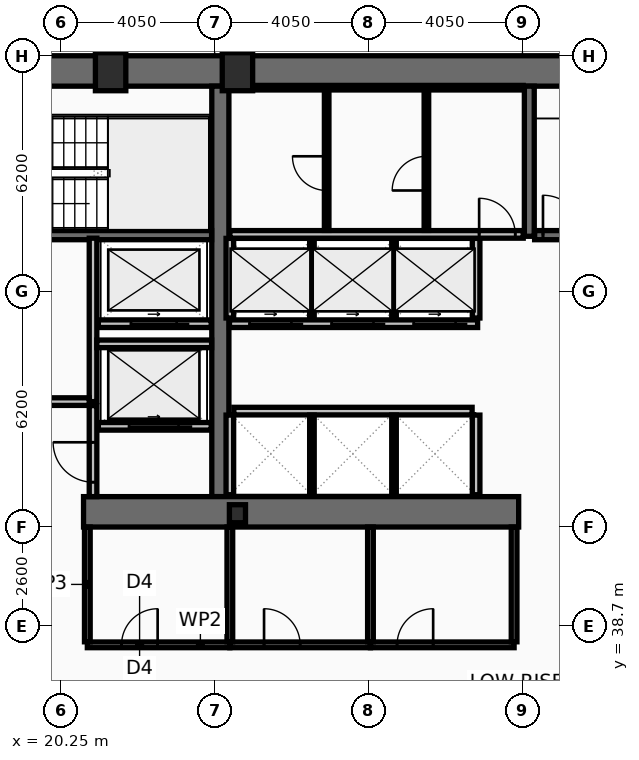
"""IFC4 building model, lengths in metres.
Left out: names, types, materials, properties, quantities, classifications, styles, units other than length and angle.
Written with IfcOpenShell. Run it as: python <this file> out.ifc"""

import sys

from ifc_helpers import new_model, si_unit, direction, frame, frame_2d, origin, origin_2d, place, context, subcontext, project, spatial, rectangle, hollow_rectangle, i_section, extrude, element, fill, save


model = new_model("IFC4")
c1 = context("Model", 3, precision=1e-05, world=origin(), true_north=direction((0.0, 1.0)))
c2 = subcontext(c1, "Body", "Model", "MODEL_VIEW")
j1 = project(units=[si_unit("LENGTHUNIT", "METRE"), si_unit("PLANEANGLEUNIT", "RADIAN")], contexts=[c1])
p1 = place(None, origin())
s1 = spatial("IfcSite", under=j1, at=p1, CompositionType="ELEMENT")
p2 = place(p1, origin())
s2 = spatial("IfcBuilding", under=s1, at=p2, CompositionType="ELEMENT")
p3 = place(p2, frame((0.0, 0.0, 41.8)))
s3 = spatial("IfcBuildingStorey", under=s2, at=p3, CompositionType="ELEMENT", Elevation=41.8)
p4 = place(p3, frame((16.2, 53.3, 0.0), z_axis=(0.0, 0.0, 1.0), x_axis=(1.0, 0.0, 0.0)))
e1 = element("IfcWall", 1, at=p4, inside=s3, PredefinedType="SHEAR", context=c2, shape_type="SweptSolid", body=[
    extrude(rectangle(XDim=40.5, YDim=0.8, at=frame_2d((20.25, 0.0))), origin(), (0.0, 0.0, 1.0), 3.82),
])
p5 = place(p3, frame((24.45, 42.1, 0.0), z_axis=(0.0, 0.0, 1.0), x_axis=(0.0, 1.0, 0.0)))
e2 = element("IfcWall", 2, at=p5, inside=s3, PredefinedType="SHEAR", context=c2, shape_type="SweptSolid", body=[
    extrude(rectangle(XDim=10.8, YDim=0.45, at=frame_2d((5.4, 0.0))), origin(), (0.0, 0.0, 1.0), 3.82),
])
p6 = place(p3, frame((32.3, 41.7, 0.0), z_axis=(0.0, 0.0, 1.0), x_axis=(-1.0, 0.0, 0.0)))
e3 = element("IfcWall", 3, at=p6, inside=s3, PredefinedType="SHEAR", context=c2, shape_type="SweptSolid", body=[
    extrude(rectangle(XDim=11.45, YDim=0.8, at=frame_2d((5.725, 0.0))), origin(), (0.0, 0.0, 1.0), 3.82),
])
p7 = place(p3, frame((32.58, 48.95, 0.0), z_axis=(0.0, 0.0, 1.0), x_axis=(0.0, 1.0, 0.0)))
e4 = element("IfcWall", 4, at=p7, inside=s3, PredefinedType="SHEAR", context=c2, shape_type="SweptSolid", body=[
    extrude(rectangle(XDim=3.95, YDim=0.26, at=frame_2d((1.975, 0.0))), origin(), (0.0, 0.0, 1.0), 3.82),
])
p8 = place(p3, frame((17.0, 48.98, 0.0), z_axis=(0.0, 0.0, 1.0), x_axis=(1.0, 0.0, 0.0)))
e5 = element("IfcWall", 5, at=p8, inside=s3, PredefinedType="SHEAR", context=c2, shape_type="SweptSolid", body=[
    extrude(rectangle(XDim=7.22, YDim=0.24, at=frame_2d((3.61, 0.0))), origin(), (0.0, 0.0, 1.0), 3.82),
])
p9 = place(p8, frame((0.22, 0.0, 0.0)))
e6 = element("IfcOpeningElement", 6, at=p9, cuts=e5, PredefinedType="OPENING", context=c2, shape_type="SweptSolid", body=[
    extrude(rectangle(XDim=1.05, YDim=2.15, at=frame_2d((0.525, 1.075))), frame((0.0, 0.13, 0.0), z_axis=(0.0, -1.0, 0.0), x_axis=(1.0, 0.0, 0.0)), (0.0, 0.0, 1.0), 0.26),
])
p10 = place(p3, frame((32.72, 48.98, 0.0), z_axis=(0.0, 0.0, 1.0), x_axis=(1.0, 0.0, 0.0)))
e7 = element("IfcWall", 7, at=p10, inside=s3, PredefinedType="SHEAR", context=c2, shape_type="SweptSolid", body=[
    extrude(rectangle(XDim=7.56, YDim=0.24, at=frame_2d((3.78, 0.0))), origin(), (0.0, 0.0, 1.0), 3.82),
])
p11 = place(p10, frame((0.22, 0.0, 0.0)))
e8 = element("IfcOpeningElement", 8, at=p11, cuts=e7, PredefinedType="OPENING", context=c2, shape_type="SweptSolid", body=[
    extrude(rectangle(XDim=1.05, YDim=2.15, at=frame_2d((0.525, 1.075))), frame((0.0, 0.13, 0.0), z_axis=(0.0, -1.0, 0.0), x_axis=(1.0, 0.0, 0.0)), (0.0, 0.0, 1.0), 0.26),
])
for number, where, z_axis, x_axis in (
    (9, (21.562, 53.28, 0.0), (0.0, 0.0, 1.0), (1.0, 0.0, 0.0)),
    (10, (24.9, 53.28, 0.0), (0.0, 0.0, 1.0), (1.0, 0.0, 0.0)),
):
    element("IfcColumn", number, at=place(p3, frame(where, z_axis=z_axis, x_axis=x_axis)), inside=s3, PredefinedType="COLUMN", context=c2, shape_type="SweptSolid", body=[
        extrude(hollow_rectangle(XDim=0.8, YDim=1.0, WallThickness=0.055, at=origin_2d()), origin(), (0.0, 0.0, 1.0), 4.0),
    ])
p12 = place(p3, frame((24.9, 41.65, 0.0), z_axis=(0.0, 0.0, 1.0), x_axis=(1.0, 0.0, 0.0)))
e11 = element("IfcColumn", 11, at=p12, inside=s3, PredefinedType="COLUMN", context=c2, shape_type="SweptSolid", body=[
    extrude(i_section(OverallWidth=0.424, OverallDepth=0.474, WebThickness=0.048, FlangeThickness=0.077, at=origin_2d()), origin(), (0.0, 0.0, 1.0), 4.0),
])
p13 = place(p3, frame((24.21, 43.95, 0.0), z_axis=(0.0, 0.0, 1.0), x_axis=(-1.0, 0.0, 0.0)))
e12 = element("IfcWall", 12, at=p13, inside=s3, PredefinedType="PARTITIONING", context=c2, shape_type="SweptSolid", body=[
    extrude(rectangle(XDim=2.97, YDim=0.2, at=frame_2d((1.485, 0.0))), origin(), (0.0, 0.0, 1.0), 3.82),
])
p14 = place(p13, frame((0.86, 0.0, 0.0)))
e13 = element("IfcOpeningElement", 13, at=p14, cuts=e12, PredefinedType="OPENING", context=c2, shape_type="SweptSolid", body=[
    extrude(rectangle(XDim=1.3, YDim=2.18, at=frame_2d((0.65, 1.09))), frame((0.0, 0.11, 0.0), z_axis=(0.0, -1.0, 0.0), x_axis=(1.0, 0.0, 0.0)), (0.0, 0.0, 1.0), 0.22),
])
p15 = place(p3, frame((24.21, 46.65, 0.0), z_axis=(0.0, 0.0, 1.0), x_axis=(-1.0, 0.0, 0.0)))
e14 = element("IfcWall", 14, at=p15, inside=s3, PredefinedType="PARTITIONING", context=c2, shape_type="SweptSolid", body=[
    extrude(rectangle(XDim=2.97, YDim=0.2, at=frame_2d((1.485, 0.0))), origin(), (0.0, 0.0, 1.0), 3.82),
])
p16 = place(p15, frame((0.91, 0.0, 0.0)))
e15 = element("IfcOpeningElement", 15, at=p16, cuts=e14, PredefinedType="OPENING", context=c2, shape_type="SweptSolid", body=[
    extrude(rectangle(XDim=1.2, YDim=2.18, at=frame_2d((0.6, 1.09))), frame((0.0, 0.11, 0.0), z_axis=(0.0, -1.0, 0.0), x_axis=(1.0, 0.0, 0.0)), (0.0, 0.0, 1.0), 0.22),
])
p17 = place(p3, frame((31.22, 46.65, 0.0), z_axis=(0.0, 0.0, 1.0), x_axis=(-1.0, 0.0, 0.0)))
e16 = element("IfcWall", 16, at=p17, inside=s3, PredefinedType="PARTITIONING", context=c2, shape_type="SweptSolid", body=[
    extrude(rectangle(XDim=6.53, YDim=0.2, at=frame_2d((3.265, 0.0))), origin(), (0.0, 0.0, 1.0), 3.82),
])
p18 = place(p17, frame((4.9, 0.0, 0.0)))
e17 = element("IfcOpeningElement", 17, at=p18, cuts=e16, PredefinedType="OPENING", context=c2, shape_type="SweptSolid", body=[
    extrude(rectangle(XDim=1.1, YDim=2.18, at=frame_2d((0.55, 1.09))), frame((0.0, 0.11, 0.0), z_axis=(0.0, -1.0, 0.0), x_axis=(1.0, 0.0, 0.0)), (0.0, 0.0, 1.0), 0.22),
])
p19 = place(p17, frame((2.74, 0.0, 0.0)))
e18 = element("IfcOpeningElement", 18, at=p19, cuts=e16, PredefinedType="OPENING", context=c2, shape_type="SweptSolid", body=[
    extrude(rectangle(XDim=1.1, YDim=2.18, at=frame_2d((0.55, 1.09))), frame((0.0, 0.11, 0.0), z_axis=(0.0, -1.0, 0.0), x_axis=(1.0, 0.0, 0.0)), (0.0, 0.0, 1.0), 0.22),
])
p20 = place(p17, frame((0.58, 0.0, 0.0)))
e19 = element("IfcOpeningElement", 19, at=p20, cuts=e16, PredefinedType="OPENING", context=c2, shape_type="SweptSolid", body=[
    extrude(rectangle(XDim=1.1, YDim=2.18, at=frame_2d((0.55, 1.09))), frame((0.0, 0.11, 0.0), z_axis=(0.0, -1.0, 0.0), x_axis=(1.0, 0.0, 0.0)), (0.0, 0.0, 1.0), 0.22),
])
p21 = place(p3, frame((21.1, 44.6, 0.0), z_axis=(0.0, 0.0, 1.0), x_axis=(0.0, 1.0, 0.0)))
e20 = element("IfcWall", 20, at=p21, inside=s3, PredefinedType="PARTITIONING", context=c2, shape_type="SweptSolid", body=[
    extrude(rectangle(XDim=4.3, YDim=0.2, at=frame_2d((2.15, 0.0))), origin(), (0.0, 0.0, 1.0), 3.82),
])
p22 = place(p3, frame((17.0, 44.6, 0.0), z_axis=(0.0, 0.0, 1.0), x_axis=(1.0, 0.0, 0.0)))
e21 = element("IfcWall", 21, at=p22, inside=s3, PredefinedType="PARTITIONING", context=c2, shape_type="SweptSolid", body=[
    extrude(rectangle(XDim=4.0, YDim=0.2, at=frame_2d((2.0, 0.0))), origin(), (0.0, 0.0, 1.0), 3.82),
])
p23 = place(p22, frame((1.25, 0.0, 0.0)))
e22 = element("IfcOpeningElement", 22, at=p23, cuts=e21, PredefinedType="OPENING", context=c2, shape_type="SweptSolid", body=[
    extrude(rectangle(XDim=1.05, YDim=2.15, at=frame_2d((0.525, 1.075))), frame((0.0, 0.11, 0.0), z_axis=(0.0, -1.0, 0.0), x_axis=(1.0, 0.0, 0.0)), (0.0, 0.0, 1.0), 0.22),
])
p24 = place(p3, frame((21.2, 46.12, 0.0), z_axis=(0.0, 0.0, 1.0), x_axis=(1.0, 0.0, 0.0)))
e23 = element("IfcWall", 23, at=p24, inside=s3, PredefinedType="PARTITIONING", context=c2, shape_type="SweptSolid", body=[
    extrude(rectangle(XDim=3.02, YDim=0.2, at=frame_2d((1.51, 0.0))), origin(), (0.0, 0.0, 1.0), 3.82),
])
p25 = place(p3, frame((21.1, 42.1, 0.0), z_axis=(0.0, 0.0, 1.0), x_axis=(0.0, 1.0, 0.0)))
e24 = element("IfcWall", 24, at=p25, inside=s3, PredefinedType="PARTITIONING", context=c2, shape_type="SweptSolid", body=[
    extrude(rectangle(XDim=2.395, YDim=0.2, at=frame_2d((1.198, 0.0))), origin(), (0.0, 0.0, 1.0), 3.82),
])
p26 = place(p25, frame((0.38, 0.0, 0.0)))
e25 = element("IfcOpeningElement", 25, at=p26, cuts=e24, PredefinedType="OPENING", context=c2, shape_type="SweptSolid", body=[
    extrude(rectangle(XDim=1.05, YDim=2.15, at=frame_2d((0.525, 1.075))), frame((0.0, 0.11, 0.0), z_axis=(0.0, -1.0, 0.0), x_axis=(1.0, 0.0, 0.0)), (0.0, 0.0, 1.0), 0.22),
])
for number, where, z_axis, x_axis in (
    (26, (24.7, 46.8, 0.0), (0.0, 0.0, 1.0), (0.0, 1.0, 0.0)),
    (27, (31.18, 46.8, 0.0), (0.0, 0.0, 1.0), (0.0, 1.0, 0.0)),
):
    element("IfcWall", number, at=place(p3, frame(where, z_axis=z_axis, x_axis=x_axis)), inside=s3, PredefinedType="PARTITIONING", context=c2, shape_type="SweptSolid", body=[
        extrude(rectangle(XDim=2.095, YDim=0.2, at=frame_2d((1.047, 0.0))), origin(), (0.0, 0.0, 1.0), 3.82),
    ])
for number, where, z_axis, x_axis in (
    (28, (26.86, 46.8, 0.0), (0.0, 0.0, 1.0), (0.0, 1.0, 0.0)),
    (29, (29.02, 46.8, 0.0), (0.0, 0.0, 1.0), (0.0, 1.0, 0.0)),
):
    element("IfcWall", number, at=place(p3, frame(where, z_axis=z_axis, x_axis=x_axis)), inside=s3, PredefinedType="PARTITIONING", context=c2, shape_type="SweptSolid", body=[
        extrude(rectangle(XDim=2.095, YDim=0.12, at=frame_2d((1.047, 0.0))), origin(), (0.0, 0.0, 1.0), 3.82),
    ])
p27 = place(p3, frame((24.805, 44.35, 0.0), z_axis=(0.0, 0.0, 1.0), x_axis=(1.0, 0.0, 0.0)))
e30 = element("IfcWall", 30, at=p27, inside=s3, PredefinedType="PARTITIONING", context=c2, shape_type="SweptSolid", body=[
    extrude(rectangle(XDim=6.27, YDim=0.2, at=frame_2d((3.135, 0.0))), origin(), (0.0, 0.0, 1.0), 3.82),
])
for number, where, z_axis, x_axis in (
    (31, (24.7, 42.15, 0.0), (0.0, 0.0, 1.0), (0.0, 1.0, 0.0)),
    (32, (31.18, 42.15, 0.0), (0.0, 0.0, 1.0), (0.0, 1.0, 0.0)),
):
    element("IfcWall", number, at=place(p3, frame(where, z_axis=z_axis, x_axis=x_axis)), inside=s3, PredefinedType="PARTITIONING", context=c2, shape_type="SweptSolid", body=[
        extrude(rectangle(XDim=2.095, YDim=0.2, at=frame_2d((1.048, 0.0))), origin(), (0.0, 0.0, 1.0), 3.82),
    ])
for number, where, z_axis, x_axis in (
    (33, (26.86, 42.15, 0.0), (0.0, 0.0, 1.0), (0.0, 1.0, 0.0)),
    (34, (29.02, 42.15, 0.0), (0.0, 0.0, 1.0), (0.0, 1.0, 0.0)),
):
    element("IfcWall", number, at=place(p3, frame(where, z_axis=z_axis, x_axis=x_axis)), inside=s3, PredefinedType="PARTITIONING", context=c2, shape_type="SweptSolid", body=[
        extrude(rectangle(XDim=2.095, YDim=0.12, at=frame_2d((1.048, 0.0))), origin(), (0.0, 0.0, 1.0), 3.82),
    ])
p28 = place(p3, frame((24.7, 52.86, 0.0), z_axis=(0.0, 0.0, 1.0), x_axis=(1.0, 0.0, 0.0)))
e35 = element("IfcWall", 35, at=p28, inside=s3, PredefinedType="PARTITIONING", context=c2, shape_type="SweptSolid", body=[
    extrude(rectangle(XDim=7.72, YDim=0.12, at=frame_2d((3.86, 0.0))), origin(), (0.0, 0.0, 1.0), 3.82),
])
p29 = place(p3, frame((24.7, 49.0, 0.0), z_axis=(0.0, 0.0, 1.0), x_axis=(1.0, 0.0, 0.0)))
e36 = element("IfcWall", 36, at=p29, inside=s3, PredefinedType="PARTITIONING", context=c2, shape_type="SweptSolid", body=[
    extrude(rectangle(XDim=7.72, YDim=0.2, at=frame_2d((3.86, 0.0))), origin(), (0.0, 0.0, 1.0), 3.82),
])
p30 = place(p29, frame((6.56, 0.0, 0.0)))
e37 = element("IfcOpeningElement", 37, at=p30, cuts=e36, PredefinedType="OPENING", context=c2, shape_type="SweptSolid", body=[
    extrude(rectangle(XDim=0.95, YDim=2.1, at=frame_2d((0.475, 1.05))), frame((0.0, 0.11, 0.0), z_axis=(0.0, -1.0, 0.0), x_axis=(1.0, 0.0, 0.0)), (0.0, 0.0, 1.0), 0.22),
])
p31 = place(p3, frame((27.248, 49.105, 0.0), z_axis=(0.0, 0.0, 1.0), x_axis=(0.0, 1.0, 0.0)))
e38 = element("IfcWall", 38, at=p31, inside=s3, PredefinedType="PARTITIONING", context=c2, shape_type="SweptSolid", body=[
    extrude(rectangle(XDim=3.69, YDim=0.12, at=frame_2d((1.845, 0.0))), origin(), (0.0, 0.0, 1.0), 3.82),
])
p32 = place(p31, frame((1.05, 0.0, 0.0)))
e39 = element("IfcOpeningElement", 39, at=p32, cuts=e38, PredefinedType="OPENING", context=c2, shape_type="SweptSolid", body=[
    extrude(rectangle(XDim=0.9, YDim=2.05, at=frame_2d((0.45, 1.025))), frame((0.0, 0.07, 0.0), z_axis=(0.0, -1.0, 0.0), x_axis=(1.0, 0.0, 0.0)), (0.0, 0.0, 1.0), 0.14),
])
p33 = place(p3, frame((29.872, 49.105, 0.0), z_axis=(0.0, 0.0, 1.0), x_axis=(0.0, 1.0, 0.0)))
e40 = element("IfcWall", 40, at=p33, inside=s3, PredefinedType="PARTITIONING", context=c2, shape_type="SweptSolid", body=[
    extrude(rectangle(XDim=3.69, YDim=0.12, at=frame_2d((1.845, 0.0))), origin(), (0.0, 0.0, 1.0), 3.82),
])
p34 = place(p33, frame((1.05, 0.0, 0.0)))
e41 = element("IfcOpeningElement", 41, at=p34, cuts=e40, PredefinedType="OPENING", context=c2, shape_type="SweptSolid", body=[
    extrude(rectangle(XDim=0.9, YDim=2.05, at=frame_2d((0.45, 1.025))), frame((0.0, 0.07, 0.0), z_axis=(0.0, -1.0, 0.0), x_axis=(1.0, 0.0, 0.0)), (0.0, 0.0, 1.0), 0.14),
])
p35 = place(p3, frame((20.95, 38.2, 0.0), z_axis=(0.0, 0.0, 1.0), x_axis=(1.0, 0.0, 0.0)))
e42 = element("IfcWall", 42, at=p35, inside=s3, PredefinedType="PARTITIONING", context=c2, shape_type="SweptSolid", body=[
    extrude(rectangle(XDim=3.75, YDim=0.15, at=frame_2d((1.875, 0.0))), origin(), (0.0, 0.0, 1.0), 3.01),
])
p36 = place(p35, frame((0.9, 0.0, 0.0)))
e43 = element("IfcOpeningElement", 43, at=p36, cuts=e42, PredefinedType="OPENING", context=c2, shape_type="SweptSolid", body=[
    extrude(rectangle(XDim=0.95, YDim=2.05, at=frame_2d((0.475, 1.025))), frame((0.0, 0.085, 0.0), z_axis=(0.0, -1.0, 0.0), x_axis=(1.0, 0.0, 0.0)), (0.0, 0.0, 1.0), 0.17),
])
p37 = place(p3, frame((24.7, 38.2, 0.0), z_axis=(0.0, 0.0, 1.0), x_axis=(1.0, 0.0, 0.0)))
e44 = element("IfcWall", 44, at=p37, inside=s3, PredefinedType="PARTITIONING", context=c2, shape_type="SweptSolid", body=[
    extrude(rectangle(XDim=3.7, YDim=0.15, at=frame_2d((1.85, 0.0))), origin(), (0.0, 0.0, 1.0), 3.01),
])
p38 = place(p37, frame((0.9, 0.0, 0.0)))
e45 = element("IfcOpeningElement", 45, at=p38, cuts=e44, PredefinedType="OPENING", context=c2, shape_type="SweptSolid", body=[
    extrude(rectangle(XDim=0.95, YDim=2.05, at=frame_2d((0.475, 1.025))), frame((0.0, 0.085, 0.0), z_axis=(0.0, -1.0, 0.0), x_axis=(1.0, 0.0, 0.0)), (0.0, 0.0, 1.0), 0.17),
])
p39 = place(p3, frame((28.4, 38.2, 0.0), z_axis=(0.0, 0.0, 1.0), x_axis=(1.0, 0.0, 0.0)))
e46 = element("IfcWall", 46, at=p39, inside=s3, PredefinedType="PARTITIONING", context=c2, shape_type="SweptSolid", body=[
    extrude(rectangle(XDim=3.78, YDim=0.15, at=frame_2d((1.89, 0.0))), origin(), (0.0, 0.0, 1.0), 3.01),
])
p40 = place(p39, frame((0.7, 0.0, 0.0)))
e47 = element("IfcOpeningElement", 47, at=p40, cuts=e46, PredefinedType="OPENING", context=c2, shape_type="SweptSolid", body=[
    extrude(rectangle(XDim=0.95, YDim=2.05, at=frame_2d((0.475, 1.025))), frame((0.0, 0.085, 0.0), z_axis=(0.0, -1.0, 0.0), x_axis=(1.0, 0.0, 0.0)), (0.0, 0.0, 1.0), 0.17),
])
p41 = place(p3, frame((20.95, 38.28, 0.0), z_axis=(0.0, 0.0, 1.0), x_axis=(0.0, 1.0, 0.0)))
e48 = element("IfcWall", 48, at=p41, inside=s3, PredefinedType="PARTITIONING", context=c2, shape_type="SweptSolid", body=[
    extrude(rectangle(XDim=3.02, YDim=0.15, at=frame_2d((1.51, 0.0))), origin(), (0.0, 0.0, 1.0), 3.82),
])
p42 = place(p3, frame((24.7, 38.28, 0.0), z_axis=(0.0, 0.0, 1.0), x_axis=(0.0, 1.0, 0.0)))
e49 = element("IfcWall", 49, at=p42, inside=s3, PredefinedType="PARTITIONING", context=c2, shape_type="SweptSolid", body=[
    extrude(rectangle(XDim=3.02, YDim=0.15, at=frame_2d((1.51, 0.0))), origin(), (0.0, 0.0, 1.0), 3.01),
])
for number, where, z_axis, x_axis in (
    (50, (28.4, 38.28, 0.0), (0.0, 0.0, 1.0), (0.0, 1.0, 0.0)),
    (51, (32.18, 38.28, 0.0), (0.0, 0.0, 1.0), (0.0, 1.0, 0.0)),
):
    element("IfcWall", number, at=place(p3, frame(where, z_axis=z_axis, x_axis=x_axis)), inside=s3, PredefinedType="PARTITIONING", context=c2, shape_type="SweptSolid", body=[
        extrude(rectangle(XDim=3.02, YDim=0.15, at=frame_2d((1.51, 0.0))), origin(), (0.0, 0.0, 1.0), 3.82),
    ])
p43 = place(p11, origin())
e52 = element("IfcDoor", 52, at=p43, inside=s3, OperationType="SINGLE_SWING_LEFT", PredefinedType="DOOR", context=c2, shape_type="SweptSolid", body=[
    extrude(rectangle(XDim=1.05, YDim=2.15, at=frame_2d((0.525, 1.075))), frame((0.0, 0.025, 0.0), z_axis=(0.0, -1.0, 0.0), x_axis=(1.0, 0.0, 0.0)), (0.0, 0.0, 1.0), 0.05),
])
fill(e8, e52)
p44 = place(p14, origin())
e53 = element("IfcDoor", 53, at=p44, inside=s3, OperationType="SLIDING_TO_LEFT", PredefinedType="DOOR", context=c2, shape_type="SweptSolid", body=[
    extrude(rectangle(XDim=1.3, YDim=2.18, at=frame_2d((0.65, 1.09))), frame((0.0, 0.025, 0.0), z_axis=(0.0, -1.0, 0.0), x_axis=(1.0, 0.0, 0.0)), (0.0, 0.0, 1.0), 0.05),
])
fill(e13, e53)
p45 = place(p16, origin())
e54 = element("IfcDoor", 54, at=p45, inside=s3, OperationType="SLIDING_TO_LEFT", PredefinedType="DOOR", context=c2, shape_type="SweptSolid", body=[
    extrude(rectangle(XDim=1.2, YDim=2.18, at=frame_2d((0.6, 1.09))), frame((0.0, 0.025, 0.0), z_axis=(0.0, -1.0, 0.0), x_axis=(1.0, 0.0, 0.0)), (0.0, 0.0, 1.0), 0.05),
])
fill(e15, e54)
p46 = place(p18, origin())
e55 = element("IfcDoor", 55, at=p46, inside=s3, OperationType="SLIDING_TO_LEFT", PredefinedType="DOOR", context=c2, shape_type="SweptSolid", body=[
    extrude(rectangle(XDim=1.1, YDim=2.18, at=frame_2d((0.55, 1.09))), frame((0.0, 0.025, 0.0), z_axis=(0.0, -1.0, 0.0), x_axis=(1.0, 0.0, 0.0)), (0.0, 0.0, 1.0), 0.05),
])
fill(e17, e55)
p47 = place(p19, origin())
e56 = element("IfcDoor", 56, at=p47, inside=s3, OperationType="SLIDING_TO_LEFT", PredefinedType="DOOR", context=c2, shape_type="SweptSolid", body=[
    extrude(rectangle(XDim=1.1, YDim=2.18, at=frame_2d((0.55, 1.09))), frame((0.0, 0.025, 0.0), z_axis=(0.0, -1.0, 0.0), x_axis=(1.0, 0.0, 0.0)), (0.0, 0.0, 1.0), 0.05),
])
fill(e18, e56)
p48 = place(p20, origin())
e57 = element("IfcDoor", 57, at=p48, inside=s3, OperationType="SLIDING_TO_LEFT", PredefinedType="DOOR", context=c2, shape_type="SweptSolid", body=[
    extrude(rectangle(XDim=1.1, YDim=2.18, at=frame_2d((0.55, 1.09))), frame((0.0, 0.025, 0.0), z_axis=(0.0, -1.0, 0.0), x_axis=(1.0, 0.0, 0.0)), (0.0, 0.0, 1.0), 0.05),
])
fill(e19, e57)
p49 = place(p26, origin())
e58 = element("IfcDoor", 58, at=p49, inside=s3, OperationType="SINGLE_SWING_RIGHT", PredefinedType="DOOR", context=c2, shape_type="SweptSolid", body=[
    extrude(rectangle(XDim=1.05, YDim=2.15, at=frame_2d((0.525, 1.075))), frame((0.0, 0.025, 0.0), z_axis=(0.0, -1.0, 0.0), x_axis=(1.0, 0.0, 0.0)), (0.0, 0.0, 1.0), 0.05),
])
fill(e25, e58)
p50 = place(p30, origin())
e59 = element("IfcDoor", 59, at=p50, inside=s3, OperationType="SINGLE_SWING_LEFT", PredefinedType="DOOR", context=c2, shape_type="SweptSolid", body=[
    extrude(rectangle(XDim=0.95, YDim=2.1, at=frame_2d((0.475, 1.05))), frame((0.0, 0.025, 0.0), z_axis=(0.0, -1.0, 0.0), x_axis=(1.0, 0.0, 0.0)), (0.0, 0.0, 1.0), 0.05),
])
fill(e37, e59)
p51 = place(p32, origin())
e60 = element("IfcDoor", 60, at=p51, inside=s3, OperationType="SINGLE_SWING_RIGHT", PredefinedType="DOOR", context=c2, shape_type="SweptSolid", body=[
    extrude(rectangle(XDim=0.9, YDim=2.05, at=frame_2d((0.45, 1.025))), frame((0.0, 0.025, 0.0), z_axis=(0.0, -1.0, 0.0), x_axis=(1.0, 0.0, 0.0)), (0.0, 0.0, 1.0), 0.05),
])
fill(e39, e60)
p52 = place(p34, origin())
e61 = element("IfcDoor", 61, at=p52, inside=s3, OperationType="SINGLE_SWING_LEFT", PredefinedType="DOOR", context=c2, shape_type="SweptSolid", body=[
    extrude(rectangle(XDim=0.9, YDim=2.05, at=frame_2d((0.45, 1.025))), frame((0.0, 0.025, 0.0), z_axis=(0.0, -1.0, 0.0), x_axis=(1.0, 0.0, 0.0)), (0.0, 0.0, 1.0), 0.05),
])
fill(e41, e61)
p53 = place(p36, origin())
e62 = element("IfcDoor", 62, at=p53, inside=s3, OperationType="SINGLE_SWING_RIGHT", PredefinedType="DOOR", context=c2, shape_type="SweptSolid", body=[
    extrude(rectangle(XDim=0.95, YDim=2.05, at=frame_2d((0.475, 1.025))), frame((0.0, 0.025, 0.0), z_axis=(0.0, -1.0, 0.0), x_axis=(1.0, 0.0, 0.0)), (0.0, 0.0, 1.0), 0.05),
])
fill(e43, e62)
p54 = place(p38, origin())
e63 = element("IfcDoor", 63, at=p54, inside=s3, OperationType="SINGLE_SWING_LEFT", PredefinedType="DOOR", context=c2, shape_type="SweptSolid", body=[
    extrude(rectangle(XDim=0.95, YDim=2.05, at=frame_2d((0.475, 1.025))), frame((0.0, 0.025, 0.0), z_axis=(0.0, -1.0, 0.0), x_axis=(1.0, 0.0, 0.0)), (0.0, 0.0, 1.0), 0.05),
])
fill(e45, e63)
p55 = place(p40, origin())
e64 = element("IfcDoor", 64, at=p55, inside=s3, OperationType="SINGLE_SWING_RIGHT", PredefinedType="DOOR", context=c2, shape_type="SweptSolid", body=[
    extrude(rectangle(XDim=0.95, YDim=2.05, at=frame_2d((0.475, 1.025))), frame((0.0, 0.025, 0.0), z_axis=(0.0, -1.0, 0.0), x_axis=(1.0, 0.0, 0.0)), (0.0, 0.0, 1.0), 0.05),
])
fill(e47, e64)
save(model, sys.argv[1])
